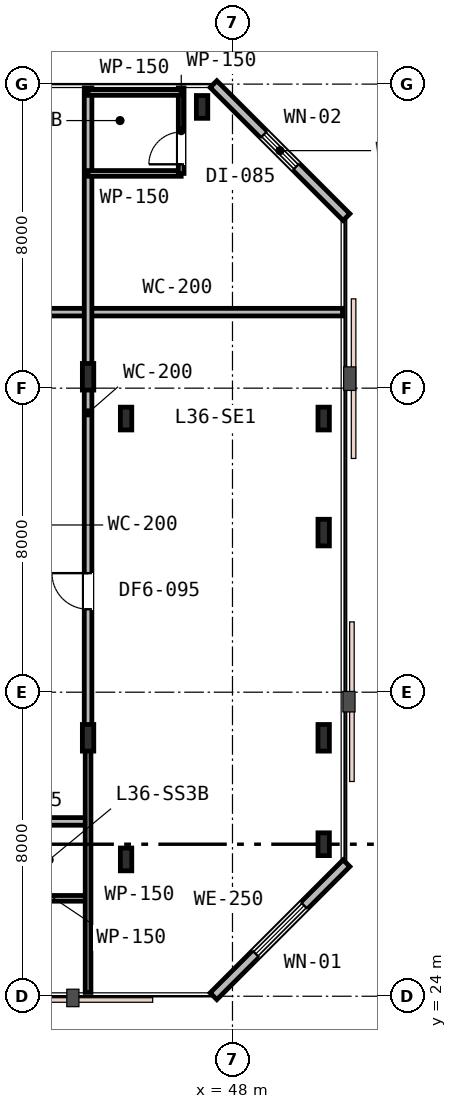
"""IFC4 building model, lengths in metres.
Left out: names, types, materials, properties, quantities, classifications, styles, units other than length and angle.
Written with IfcOpenShell. Run it as: python <this file> out.ifc"""

import sys

from ifc_helpers import new_model, si_unit, direction, frame, frame_2d, origin, origin_2d, place, context, subcontext, project, spatial, rectangle, i_section, extrude, element, fill, save


model = new_model("IFC4")
c1 = context("Model", 3, precision=1e-05, world=origin(), true_north=direction((0.0, 1.0)))
c2 = subcontext(c1, "Body", "Model", "MODEL_VIEW")
j1 = project(units=[si_unit("LENGTHUNIT", "METRE"), si_unit("PLANEANGLEUNIT", "RADIAN")], contexts=[c1])
p1 = place(None, origin())
s1 = spatial("IfcSite", under=j1, at=p1, CompositionType="ELEMENT")
p2 = place(p1, origin())
s2 = spatial("IfcBuilding", under=s1, at=p2, CompositionType="ELEMENT")
p3 = place(p2, frame((0.0, 0.0, 140.4)))
s3 = spatial("IfcBuildingStorey", under=s2, at=p3, CompositionType="ELEMENT", Elevation=140.4)
for number, where, z_axis, x_axis in (
    (1, (45.2, 27.6, 0.0), (0.0, 0.0, 1.0), (1.0, 0.0, 0.0)),
    (2, (45.2, 39.2, 0.0), (0.0, 0.0, 1.0), (1.0, 0.0, 0.0)),
    (3, (47.2, 47.4, 0.0), (0.0, 0.0, 1.0), (1.0, 0.0, 0.0)),
    (4, (50.4, 28.0, 0.0), (0.0, 0.0, 1.0), (1.0, 0.0, 0.0)),
    (5, (50.4, 39.2, 0.0), (0.0, 0.0, 1.0), (1.0, 0.0, 0.0)),
):
    element("IfcColumn", number, at=place(p3, frame(where, z_axis=z_axis, x_axis=x_axis)), inside=s3, PredefinedType="COLUMN", context=c2, shape_type="SweptSolid", body=[
        extrude(i_section(OverallWidth=0.3, OverallDepth=0.6, WebThickness=0.015, FlangeThickness=0.03, FilletRadius=0.027, at=origin_2d()), origin(), (0.0, 0.0, 1.0), 3.6),
    ])
for number, where, z_axis, x_axis in (
    (6, (44.2, 30.8, 0.0), (0.0, 0.0, 1.0), (1.0, 0.0, 0.0)),
    (7, (44.2, 40.3, 0.0), (0.0, 0.0, 1.0), (1.0, 0.0, 0.0)),
    (8, (50.4, 30.8, 0.0), (0.0, 0.0, 1.0), (1.0, 0.0, 0.0)),
    (9, (50.4, 36.2, 0.0), (0.0, 0.0, 1.0), (1.0, 0.0, 0.0)),
):
    element("IfcColumn", number, at=place(p3, frame(where, z_axis=z_axis, x_axis=x_axis)), inside=s3, PredefinedType="COLUMN", context=c2, shape_type="SweptSolid", body=[
        extrude(i_section(OverallWidth=0.3, OverallDepth=0.7, WebThickness=0.017, FlangeThickness=0.032, FilletRadius=0.027, at=origin_2d()), origin(), (0.0, 0.0, 1.0), 3.6),
    ])
p4 = place(p3, frame((47.5, 24.0, 0.0), z_axis=(0.0, 0.0, 1.0), x_axis=(0.707106781187, 0.707106781187, 0.0)))
e10 = element("IfcWall", 10, at=p4, inside=s3, PredefinedType="STANDARD", context=c2, shape_type="SweptSolid", body=[
    extrude(rectangle(XDim=4.95, YDim=0.25, at=frame_2d((2.475, 0.0))), origin(), (0.0, 0.0, 1.0), 3.24),
])
p5 = place(p4, frame((1.575, 0.0, 0.75)))
e11 = element("IfcOpeningElement", 11, at=p5, cuts=e10, PredefinedType="OPENING", context=c2, shape_type="SweptSolid", body=[
    extrude(rectangle(XDim=1.8, YDim=1.85, at=frame_2d((0.9, 0.925))), frame((0.0, 0.135, 0.0), z_axis=(0.0, -1.0, 0.0), x_axis=(1.0, 0.0, 0.0)), (0.0, 0.0, 1.0), 0.27),
])
p6 = place(p3, frame((51.0, 44.5, 0.0), z_axis=(0.0, 0.0, 1.0), x_axis=(-0.707106781187, 0.707106781187, 0.0)))
e12 = element("IfcWall", 12, at=p6, inside=s3, PredefinedType="STANDARD", context=c2, shape_type="SweptSolid", body=[
    extrude(rectangle(XDim=4.95, YDim=0.25, at=frame_2d((2.475, 0.0))), origin(), (0.0, 0.0, 1.0), 3.24),
])
p7 = place(p6, frame((1.875, 0.0, 0.85)))
e13 = element("IfcOpeningElement", 13, at=p7, cuts=e12, PredefinedType="OPENING", context=c2, shape_type="SweptSolid", body=[
    extrude(rectangle(XDim=1.2, YDim=1.6, at=frame_2d((0.6, 0.8))), frame((0.0, 0.135, 0.0), z_axis=(0.0, -1.0, 0.0), x_axis=(1.0, 0.0, 0.0)), (0.0, 0.0, 1.0), 0.27),
])
p8 = place(p3, frame((19.0, 28.6, 0.0), z_axis=(0.0, 0.0, 1.0), x_axis=(1.0, 0.0, 0.0)))
e14 = element("IfcWall", 14, at=p8, inside=s3, PredefinedType="PARTITIONING", context=c2, shape_type="SweptSolid", body=[
    extrude(rectangle(XDim=25.2, YDim=0.2, at=frame_2d((12.6, 0.0))), origin(), (0.0, 0.0, 1.0), 2.84),
])
p9 = place(p8, frame((6.561, 0.0, 0.0)))
e15 = element("IfcOpeningElement", 15, at=p9, cuts=e14, PredefinedType="OPENING", context=c2, shape_type="SweptSolid", body=[
    extrude(rectangle(XDim=0.95, YDim=2.15, at=frame_2d((0.475, 1.075))), frame((0.0, 0.11, 0.0), z_axis=(0.0, -1.0, 0.0), x_axis=(1.0, 0.0, 0.0)), (0.0, 0.0, 1.0), 0.22),
])
p10 = place(p8, frame((13.332, 0.0, 0.0)))
e16 = element("IfcOpeningElement", 16, at=p10, cuts=e14, PredefinedType="OPENING", context=c2, shape_type="SweptSolid", body=[
    extrude(rectangle(XDim=0.95, YDim=2.15, at=frame_2d((0.475, 1.075))), frame((0.0, 0.11, 0.0), z_axis=(0.0, -1.0, 0.0), x_axis=(1.0, 0.0, 0.0)), (0.0, 0.0, 1.0), 0.22),
])
p11 = place(p8, frame((20.032, 0.0, 0.0)))
e17 = element("IfcOpeningElement", 17, at=p11, cuts=e14, PredefinedType="OPENING", context=c2, shape_type="SweptSolid", body=[
    extrude(rectangle(XDim=0.95, YDim=2.15, at=frame_2d((0.475, 1.075))), frame((0.0, 0.11, 0.0), z_axis=(0.0, -1.0, 0.0), x_axis=(1.0, 0.0, 0.0)), (0.0, 0.0, 1.0), 0.22),
])
p12 = place(p3, frame((42.2, 42.0, 0.0), z_axis=(0.0, 0.0, 1.0), x_axis=(1.0, 0.0, 0.0)))
e18 = element("IfcWall", 18, at=p12, inside=s3, PredefinedType="PARTITIONING", context=c2, shape_type="SweptSolid", body=[
    extrude(rectangle(XDim=8.7, YDim=0.2, at=frame_2d((4.35, 0.0))), origin(), (0.0, 0.0, 1.0), 3.24),
])
p13 = place(p3, frame((41.788, 26.576, 0.0), z_axis=(0.0, 0.0, 1.0), x_axis=(1.0, 0.0, 0.0)))
e19 = element("IfcWall", 19, at=p13, inside=s3, PredefinedType="PARTITIONING", context=c2, shape_type="SweptSolid", body=[
    extrude(rectangle(XDim=2.412, YDim=0.15, at=frame_2d((1.206, 0.0))), origin(), (0.0, 0.0, 1.0), 3.24),
])
p14 = place(p3, frame((44.2, 30.8, 0.0), z_axis=(0.0, 0.0, 1.0), x_axis=(0.0, -1.0, 0.0)))
e20 = element("IfcWall", 20, at=p14, inside=s3, PredefinedType="PARTITIONING", context=c2, shape_type="SweptSolid", body=[
    extrude(rectangle(XDim=6.7, YDim=0.15, at=frame_2d((3.35, 0.0))), origin(), (0.0, 0.0, 1.0), 2.84),
])
p15 = place(p3, frame((44.2, 30.8, 0.0), z_axis=(0.0, 0.0, 1.0), x_axis=(0.0, 1.0, 0.0)))
e21 = element("IfcWall", 21, at=p15, inside=s3, PredefinedType="PARTITIONING", context=c2, shape_type="SweptSolid", body=[
    extrude(rectangle(XDim=17.1, YDim=0.2, at=frame_2d((8.55, 0.0))), origin(), (0.0, 0.0, 1.0), 2.84),
])
p16 = place(p15, frame((3.382, 0.0, 0.0)))
e22 = element("IfcOpeningElement", 22, at=p16, cuts=e21, PredefinedType="OPENING", context=c2, shape_type="SweptSolid", body=[
    extrude(rectangle(XDim=0.95, YDim=2.15, at=frame_2d((0.475, 1.075))), frame((0.0, 0.11, 0.0), z_axis=(0.0, -1.0, 0.0), x_axis=(1.0, 0.0, 0.0)), (0.0, 0.0, 1.0), 0.22),
])
p17 = place(p3, frame((44.2, 45.65, 0.0), z_axis=(0.0, 0.0, 1.0), x_axis=(1.0, 0.0, 0.0)))
e23 = element("IfcWall", 23, at=p17, inside=s3, PredefinedType="PARTITIONING", context=c2, shape_type="SweptSolid", body=[
    extrude(rectangle(XDim=2.45, YDim=0.15, at=frame_2d((1.225, 0.0))), origin(), (0.0, 0.0, 1.0), 3.24),
])
p18 = place(p3, frame((46.65, 45.65, 0.0), z_axis=(0.0, 0.0, 1.0), x_axis=(0.0, 1.0, 0.0)))
e24 = element("IfcWall", 24, at=p18, inside=s3, PredefinedType="PARTITIONING", context=c2, shape_type="SweptSolid", body=[
    extrude(rectangle(XDim=2.25, YDim=0.15, at=frame_2d((1.125, 0.0))), origin(), (0.0, 0.0, 1.0), 2.92),
])
p19 = place(p18, frame((0.24, 0.0, 0.0)))
e25 = element("IfcOpeningElement", 25, at=p19, cuts=e24, PredefinedType="OPENING", context=c2, shape_type="SweptSolid", body=[
    extrude(rectangle(XDim=0.85, YDim=2.15, at=frame_2d((0.425, 1.075))), frame((0.0, 0.085, 0.0), z_axis=(0.0, -1.0, 0.0), x_axis=(1.0, 0.0, 0.0)), (0.0, 0.0, 1.0), 0.17),
])
p20 = place(p3, frame((44.2, 47.78, 0.0), z_axis=(0.0, 0.0, 1.0), x_axis=(1.0, 0.0, 0.0)))
e26 = element("IfcWall", 26, at=p20, inside=s3, PredefinedType="PARTITIONING", context=c2, shape_type="SweptSolid", body=[
    extrude(rectangle(XDim=2.45, YDim=0.15, at=frame_2d((1.225, 0.0))), origin(), (0.0, 0.0, 1.0), 2.92),
])
p21 = place(p5, origin())
e27 = element("IfcWindow", 27, at=p21, inside=s3, PartitioningType="SINGLE_PANEL", PredefinedType="WINDOW", context=c2, shape_type="SweptSolid", body=[
    extrude(rectangle(XDim=1.8, YDim=1.85, at=frame_2d((0.9, 0.925))), frame((0.0, 0.03, 0.0), z_axis=(0.0, -1.0, 0.0), x_axis=(1.0, 0.0, 0.0)), (0.0, 0.0, 1.0), 0.06),
])
fill(e11, e27)
p22 = place(p7, origin())
e28 = element("IfcWindow", 28, at=p22, inside=s3, PartitioningType="SINGLE_PANEL", PredefinedType="WINDOW", context=c2, shape_type="SweptSolid", body=[
    extrude(rectangle(XDim=1.2, YDim=1.6, at=frame_2d((0.6, 0.8))), frame((0.0, 0.03, 0.0), z_axis=(0.0, -1.0, 0.0), x_axis=(1.0, 0.0, 0.0)), (0.0, 0.0, 1.0), 0.06),
])
fill(e13, e28)
p23 = place(p16, origin())
e29 = element("IfcDoor", 29, at=p23, inside=s3, OperationType="SINGLE_SWING_RIGHT", PredefinedType="DOOR", context=c2, shape_type="SweptSolid", body=[
    extrude(rectangle(XDim=0.95, YDim=2.15, at=frame_2d((0.475, 1.075))), frame((0.0, 0.025, 0.0), z_axis=(0.0, -1.0, 0.0), x_axis=(1.0, 0.0, 0.0)), (0.0, 0.0, 1.0), 0.05),
])
fill(e22, e29)
p24 = place(p19, origin())
e30 = element("IfcDoor", 30, at=p24, inside=s3, OperationType="SINGLE_SWING_LEFT", PredefinedType="DOOR", context=c2, shape_type="SweptSolid", body=[
    extrude(rectangle(XDim=0.85, YDim=2.15, at=frame_2d((0.425, 1.075))), frame((0.0, 0.025, 0.0), z_axis=(0.0, -1.0, 0.0), x_axis=(1.0, 0.0, 0.0)), (0.0, 0.0, 1.0), 0.05),
])
fill(e25, e30)
save(model, sys.argv[1])
